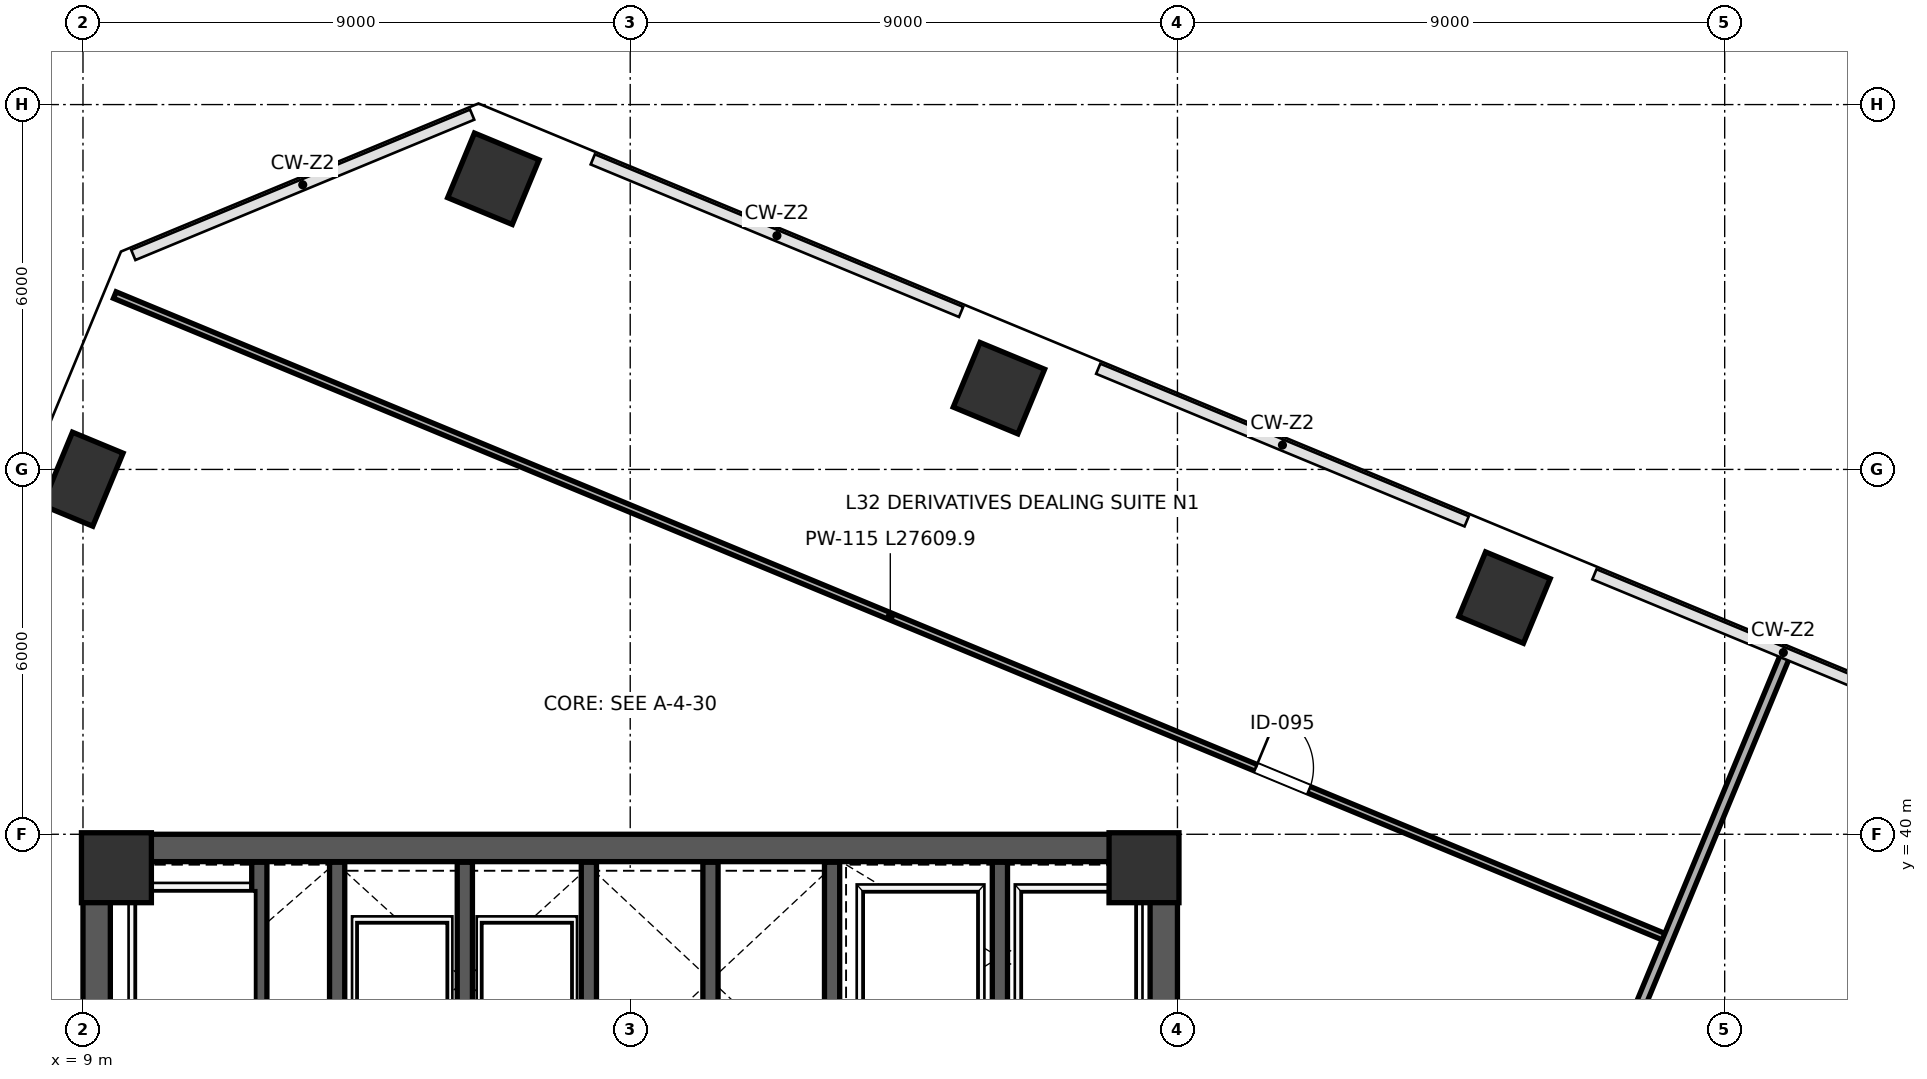
"""IFC4 building model, lengths in metres.
Left out: names, types, materials, properties, quantities, classifications, styles, units other than length and angle.
Written with IfcOpenShell. Run it as: python <this file> out.ifc"""

import sys

from ifc_helpers import new_model, si_unit, direction, frame, frame_2d, origin, origin_2d, place, context, subcontext, project, spatial, rectangle, extrude, clip, halfspace, source, transform, mapped, element, fill, save


model = new_model("IFC4")
c1 = context("Model", 3, precision=1e-05, world=origin(), true_north=direction((0.0, 1.0)))
c2 = subcontext(c1, "Body", "Model", "MODEL_VIEW")
j1 = project(units=[si_unit("LENGTHUNIT", "METRE"), si_unit("PLANEANGLEUNIT", "RADIAN")], contexts=[c1])
p1 = place(None, origin())
s1 = spatial("IfcSite", under=j1, at=p1, CompositionType="ELEMENT")
p2 = place(p1, origin())
s2 = spatial("IfcBuilding", under=s1, at=p2, CompositionType="ELEMENT")
p3 = place(p2, frame((0.0, 0.0, 145.6)))
s3 = spatial("IfcBuildingStorey", under=s2, at=p3, CompositionType="ELEMENT", Elevation=145.6)
m1 = source(origin(), c2, "Body", "SweptSolid", [
    extrude(rectangle(XDim=1.15, YDim=1.15, at=origin_2d()), origin(), (0.0, 0.0, 1.0), 4.198),
])
for number, where, z_axis, x_axis in (
    (1, (9.55, 39.45, 0.001), (0.0, 0.0, 1.0), (1.0, 0.0, 0.0)),
    (2, (26.45, 39.45, 0.001), (0.0, 0.0, 1.0), (1.0, 0.0, 0.0)),
):
    element("IfcColumn", number, at=place(p3, frame(where, z_axis=z_axis, x_axis=x_axis)), inside=s3, PredefinedType="COLUMN", context=c2, shape_type="MappedRepresentation", body=[
        mapped(m1, transform((0.0, 0.0, 0.0), scale=1.0)),
    ])
p4 = place(p3, frame((15.749, 50.78, 0.0), z_axis=(0.097326869075, 0.028683379121, 0.99483905448), x_axis=(-0.104007450325, -0.993818265574, 0.038829180877)))
e3 = element("IfcColumn", 3, at=p4, inside=s3, PredefinedType="COLUMN", context=c2, shape_type="Clipping", body=[
    clip(clip(extrude(rectangle(XDim=1.15, YDim=1.15, at=origin_2d()), origin(), (0.0, 0.0, 1.0), 4.222), halfspace(frame((0.0, 0.0, 0.077), z_axis=(0.0, 0.0, -1.0), x_axis=(1.0, 0.0, 0.0)), False)), halfspace(frame((0.0, 0.0, 4.144), z_axis=(0.0, 0.0, 1.0), x_axis=(1.0, 0.0, 0.0)), False)),
])
p5 = place(p3, frame((24.064, 47.336, 0.0), z_axis=(0.079205271408, -0.014137590507, 0.996758071708), x_axis=(-0.537848193123, -0.842479270671, 0.030789602857)))
e4 = element("IfcColumn", 4, at=p5, inside=s3, PredefinedType="COLUMN", context=c2, shape_type="Clipping", body=[
    clip(clip(extrude(rectangle(XDim=1.15, YDim=1.15, at=origin_2d()), origin(), (0.0, 0.0, 1.0), 4.214), halfspace(frame((0.0, 0.0, 0.062), z_axis=(0.0, 0.0, -1.0), x_axis=(1.0, 0.0, 0.0)), False)), halfspace(frame((0.0, 0.0, 4.152), z_axis=(0.0, 0.0, 1.0), x_axis=(1.0, 0.0, 0.0)), False)),
])
p6 = place(p3, frame((32.379, 43.892, 0.0), z_axis=(0.060938866071, -0.056999851914, 0.996512654954), x_axis=(-0.909615982387, -0.414221107493, 0.031931781881)))
e5 = element("IfcColumn", 5, at=p6, inside=s3, PredefinedType="COLUMN", context=c2, shape_type="Clipping", body=[
    clip(clip(extrude(rectangle(XDim=1.15, YDim=1.15, at=origin_2d()), origin(), (0.0, 0.0, 1.0), 4.215), halfspace(frame((0.0, 0.0, 0.064), z_axis=(0.0, 0.0, -1.0), x_axis=(1.0, 0.0, 0.0)), False)), halfspace(frame((0.0, 0.0, 4.151), z_axis=(0.0, 0.0, 1.0), x_axis=(1.0, 0.0, 0.0)), False)),
])
p7 = place(p3, frame((8.994, 45.839, 0.0), z_axis=(0.0722651345, 0.063875667324, 0.995337957409), x_axis=(0.326470768603, -0.944486389289, 0.0369093172)))
e6 = element("IfcColumn", 6, at=p7, inside=s3, PredefinedType="PILASTER", context=c2, shape_type="Clipping", body=[
    clip(clip(extrude(rectangle(XDim=0.9, YDim=1.3, at=origin_2d()), origin(), (0.0, 0.0, 1.0), 4.22), halfspace(frame((0.0, 0.0, 0.076), z_axis=(0.0, 0.0, -1.0), x_axis=(1.0, 0.0, 0.0)), False)), halfspace(frame((0.0, 0.0, 4.144), z_axis=(0.0, 0.0, 1.0), x_axis=(1.0, 0.0, 0.0)), False)),
])
p8 = place(p3, frame((9.225, 24.45, 0.0), z_axis=(0.0, 0.0, 1.0), x_axis=(0.0, 1.0, 0.0)))
e7 = element("IfcWall", 7, at=p8, inside=s3, PredefinedType="SHEAR", context=c2, shape_type="SweptSolid", body=[
    extrude(rectangle(XDim=15.1, YDim=0.45, at=frame_2d((7.55, 0.0))), origin(), (0.0, 0.0, 1.0), 3.96),
])
p9 = place(p3, frame((26.775, 24.45, 0.0), z_axis=(0.0, 0.0, 1.0), x_axis=(0.0, 1.0, 0.0)))
e8 = element("IfcWall", 8, at=p9, inside=s3, PredefinedType="SHEAR", context=c2, shape_type="SweptSolid", body=[
    extrude(rectangle(XDim=15.1, YDim=0.45, at=frame_2d((7.55, 0.0))), origin(), (0.0, 0.0, 1.0), 3.96),
])
p10 = place(p9, frame((8.6, 0.0, 0.0)))
e9 = element("IfcOpeningElement", 9, at=p10, cuts=e8, PredefinedType="OPENING", context=c2, shape_type="SweptSolid", body=[
    extrude(rectangle(XDim=1.15, YDim=2.2, at=frame_2d((0.575, 1.1))), frame((0.0, 0.235, 0.0), z_axis=(0.0, -1.0, 0.0), x_axis=(1.0, 0.0, 0.0)), (0.0, 0.0, 1.0), 0.47),
])
p11 = place(p3, frame((9.0, 39.775, 0.0), z_axis=(0.0, 0.0, 1.0), x_axis=(1.0, 0.0, 0.0)))
e10 = element("IfcWall", 10, at=p11, inside=s3, PredefinedType="SHEAR", context=c2, shape_type="SweptSolid", body=[
    extrude(rectangle(XDim=18.0, YDim=0.45, at=frame_2d((9.0, 0.0))), origin(), (0.0, 0.0, 1.0), 3.96),
])
p12 = place(p3, frame((21.32, 32.12, 0.0), z_axis=(0.0, 0.0, 1.0), x_axis=(0.0, 1.0, 0.0)))
e11 = element("IfcWall", 11, at=p12, inside=s3, PredefinedType="SHEAR", context=c2, shape_type="SweptSolid", body=[
    extrude(rectangle(XDim=7.42, YDim=0.25, at=frame_2d((3.71, 0.0))), origin(), (0.0, 0.0, 1.0), 3.96),
])
p13 = place(p12, frame((1.4, 0.0, 0.0)))
e12 = element("IfcOpeningElement", 12, at=p13, cuts=e11, PredefinedType="OPENING", context=c2, shape_type="SweptSolid", body=[
    extrude(rectangle(XDim=1.15, YDim=2.2, at=frame_2d((0.575, 1.1))), frame((0.0, 0.135, 0.0), z_axis=(0.0, -1.0, 0.0), x_axis=(1.0, 0.0, 0.0)), (0.0, 0.0, 1.0), 0.27),
])
p14 = place(p3, frame((11.9, 36.31, 0.0), z_axis=(0.0, 0.0, 1.0), x_axis=(0.0, 1.0, 0.0)))
e13 = element("IfcWall", 13, at=p14, inside=s3, PredefinedType="SHEAR", context=c2, shape_type="SweptSolid", body=[
    extrude(rectangle(XDim=3.23, YDim=0.25, at=frame_2d((1.615, 0.0))), origin(), (0.0, 0.0, 1.0), 3.96),
])
p15 = place(p3, frame((24.08, 36.48, 0.0), z_axis=(0.0, 0.0, 1.0), x_axis=(0.0, 1.0, 0.0)))
e14 = element("IfcWall", 14, at=p15, inside=s3, PredefinedType="SHEAR", context=c2, shape_type="SweptSolid", body=[
    extrude(rectangle(XDim=3.06, YDim=0.25, at=frame_2d((1.53, 0.0))), origin(), (0.0, 0.0, 1.0), 3.96),
])
for number, where, z_axis, x_axis in (
    (15, (13.18, 35.81, 0.0), (0.0, 0.0, 1.0), (0.0, 1.0, 0.0)),
    (16, (15.28, 35.81, 0.0), (0.0, 0.0, 1.0), (0.0, 1.0, 0.0)),
    (17, (17.32, 35.81, 0.0), (0.0, 0.0, 1.0), (0.0, 1.0, 0.0)),
    (18, (19.32, 35.81, 0.0), (0.0, 0.0, 1.0), (0.0, 1.0, 0.0)),
):
    element("IfcWall", number, at=place(p3, frame(where, z_axis=z_axis, x_axis=x_axis)), inside=s3, PredefinedType="SHEAR", context=c2, shape_type="SweptSolid", body=[
        extrude(rectangle(XDim=3.73, YDim=0.25, at=frame_2d((1.865, 0.0))), origin(), (0.0, 0.0, 1.0), 3.96),
    ])
p16 = place(p3, frame((9.523, 48.867, 0.0), z_axis=(0.0, 0.0, 1.0), x_axis=(0.923882225555, -0.382676930718, 0.0)))
e19 = element("IfcWall", 19, at=p16, inside=s3, PredefinedType="PARTITIONING", context=c2, shape_type="SweptSolid", body=[
    extrude(rectangle(XDim=27.61, YDim=0.115, at=frame_2d((13.805, 0.0))), origin(), (0.0, 0.0, 1.0), 3.96),
])
p17 = place(p16, frame((20.31, 0.0, 0.0)))
e20 = element("IfcOpeningElement", 20, at=p17, cuts=e19, PredefinedType="OPENING", context=c2, shape_type="SweptSolid", body=[
    extrude(rectangle(XDim=0.95, YDim=2.15, at=frame_2d((0.475, 1.075))), frame((0.0, 0.067, 0.0), z_axis=(0.0, -1.0, 0.0), x_axis=(1.0, 0.0, 0.0)), (0.0, 0.0, 1.0), 0.135),
])
p18 = place(p3, frame((30.162, 26.442, 0.0), z_axis=(0.0, 0.0, 1.0), x_axis=(0.382688600046, 0.923877391971, 0.0)))
e21 = element("IfcWall", 21, at=p18, inside=s3, PredefinedType="PARTITIONING", context=c2, shape_type="SweptSolid", body=[
    extrude(rectangle(XDim=17.84, YDim=0.16, at=frame_2d((8.92, 0.0))), origin(), (0.0, 0.0, 1.0), 3.195),
])
m2 = source(origin(), c2, "Body", "SweptSolid", [
    extrude(rectangle(XDim=0.95, YDim=2.15, at=frame_2d((0.475, 1.075))), frame((0.0, 0.025, 0.0), z_axis=(0.0, -1.0, 0.0), x_axis=(1.0, 0.0, 0.0)), (0.0, 0.0, 1.0), 0.05),
])
p19 = place(p17, origin())
e22 = element("IfcDoor", 22, at=p19, inside=s3, OperationType="SINGLE_SWING_LEFT", PredefinedType="DOOR", context=c2, shape_type="MappedRepresentation", body=[
    mapped(m2, transform((0.0, 0.0, 0.0), scale=1.0)),
])
fill(e20, e22)
save(model, sys.argv[1])
